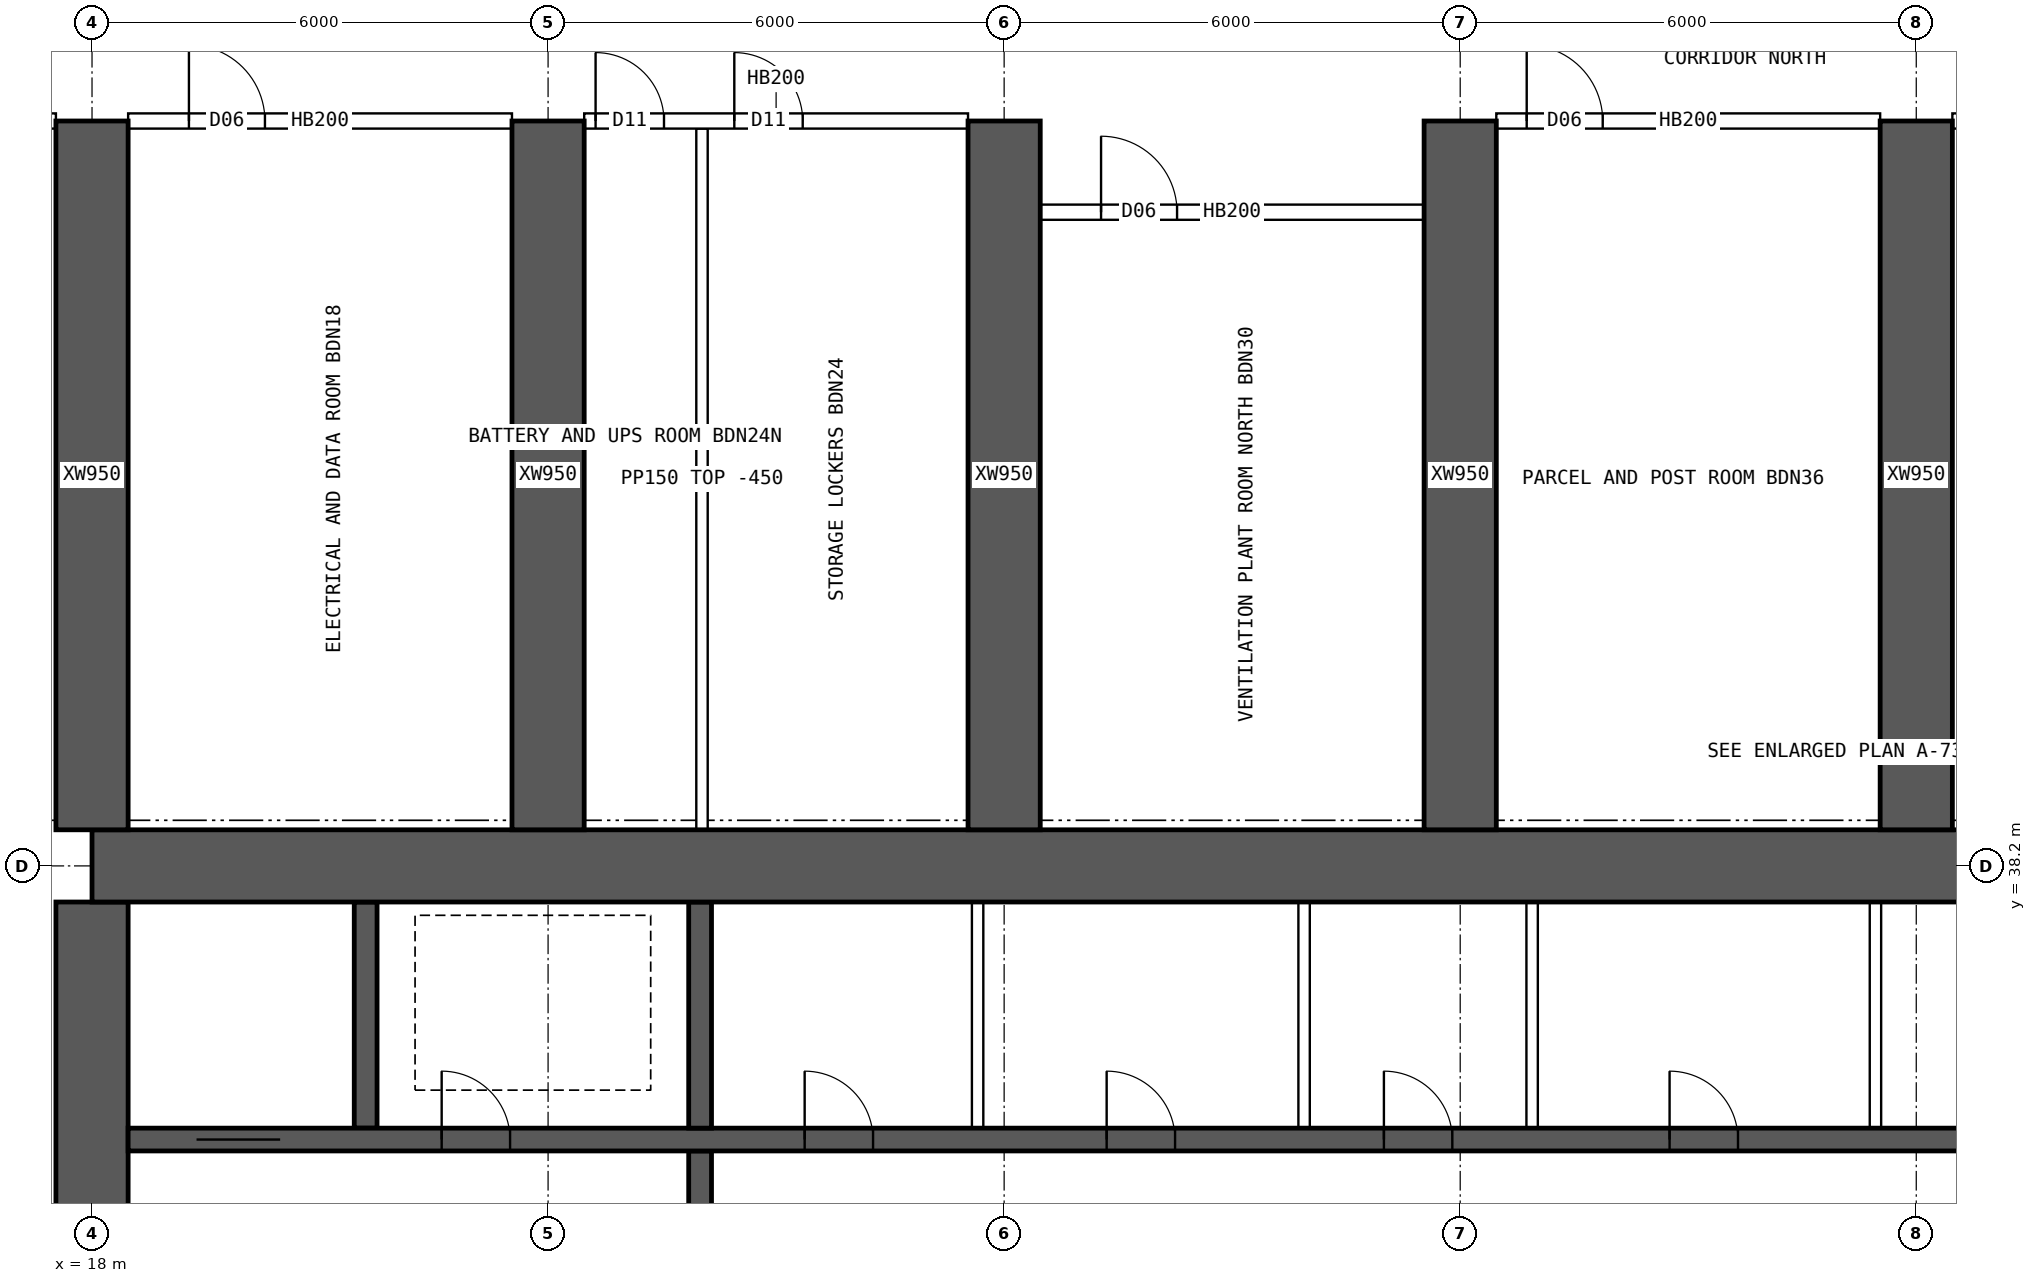
"""IFC4 building model, lengths in metres.
Left out: names, types, materials, properties, quantities, classifications, styles, units other than length and angle.
Written with IfcOpenShell. Run it as: python <this file> out.ifc"""

import sys

from ifc_helpers import new_model, si_unit, direction, frame, frame_2d, origin, place, context, subcontext, project, spatial, rectangle, extrude, element, fill, save


model = new_model("IFC4")
c1 = context("Model", 3, precision=1e-05, world=origin(), true_north=direction((0.0, 1.0)))
c2 = subcontext(c1, "Body", "Model", "MODEL_VIEW")
j1 = project(units=[si_unit("LENGTHUNIT", "METRE"), si_unit("PLANEANGLEUNIT", "RADIAN")], contexts=[c1])
p1 = place(None, origin())
s1 = spatial("IfcSite", under=j1, at=p1, CompositionType="ELEMENT")
p2 = place(p1, origin())
s2 = spatial("IfcBuilding", under=s1, at=p2, CompositionType="ELEMENT")
p3 = place(p2, frame((0.0, 0.0, 110.65)))
s3 = spatial("IfcBuildingStorey", under=s2, at=p3, CompositionType="ELEMENT", Elevation=110.65)
p4 = place(p3, frame((18.0, 38.2, 0.0), z_axis=(0.0, 0.0, 1.0), x_axis=(1.0, 0.0, 0.0)))
e1 = element("IfcWall", 1, at=p4, inside=s3, PredefinedType="SHEAR", context=c2, shape_type="SweptSolid", body=[
    extrude(rectangle(XDim=48.0, YDim=0.95, at=frame_2d((24.0, 0.0))), origin(), (0.0, 0.0, 1.0), 3.75),
])
p5 = place(p3, frame((18.0, 26.275, 0.0), z_axis=(0.0, 0.0, 1.0), x_axis=(0.0, 1.0, 0.0)))
e2 = element("IfcWall", 2, at=p5, inside=s3, PredefinedType="SHEAR", context=c2, shape_type="SweptSolid", body=[
    extrude(rectangle(XDim=11.45, YDim=0.95, at=frame_2d((5.725, 0.0))), origin(), (0.0, 0.0, 1.0), 3.75),
])
p6 = place(p5, frame((5.025, 0.0, 0.0)))
e3 = element("IfcOpeningElement", 3, at=p6, cuts=e2, PredefinedType="OPENING", context=c2, shape_type="SweptSolid", body=[
    extrude(rectangle(XDim=1.2, YDim=2.1, at=frame_2d((0.6, 1.05))), frame((0.0, 0.485, 0.0), z_axis=(0.0, -1.0, 0.0), x_axis=(1.0, 0.0, 0.0)), (0.0, 0.0, 1.0), 0.97),
])
p7 = place(p3, frame((18.475, 34.6, 0.0), z_axis=(0.0, 0.0, 1.0), x_axis=(1.0, 0.0, 0.0)))
e4 = element("IfcWall", 4, at=p7, inside=s3, PredefinedType="SHEAR", context=c2, shape_type="SweptSolid", body=[
    extrude(rectangle(XDim=47.05, YDim=0.3, at=frame_2d((23.525, 0.0))), origin(), (0.0, 0.0, 1.0), 3.75),
])
p8 = place(p7, frame((0.9, 0.0, 0.0)))
e5 = element("IfcOpeningElement", 5, at=p8, cuts=e4, PredefinedType="OPENING", context=c2, shape_type="SweptSolid", body=[
    extrude(rectangle(XDim=1.1, YDim=2.1, at=frame_2d((0.55, 1.05))), frame((0.0, 0.16, 0.0), z_axis=(0.0, -1.0, 0.0), x_axis=(1.0, 0.0, 0.0)), (0.0, 0.0, 1.0), 0.32),
])
p9 = place(p7, frame((45.05, 0.0, 0.0)))
e6 = element("IfcOpeningElement", 6, at=p9, cuts=e4, PredefinedType="OPENING", context=c2, shape_type="SweptSolid", body=[
    extrude(rectangle(XDim=1.1, YDim=2.1, at=frame_2d((0.55, 1.05))), frame((0.0, 0.16, 0.0), z_axis=(0.0, -1.0, 0.0), x_axis=(1.0, 0.0, 0.0)), (0.0, 0.0, 1.0), 0.32),
])
p10 = place(p7, frame((4.125, 0.0, 0.0)))
e7 = element("IfcOpeningElement", 7, at=p10, cuts=e4, PredefinedType="OPENING", context=c2, shape_type="SweptSolid", body=[
    extrude(rectangle(XDim=0.9, YDim=2.1, at=frame_2d((0.45, 1.05))), frame((0.0, 0.16, 0.0), z_axis=(0.0, -1.0, 0.0), x_axis=(1.0, 0.0, 0.0)), (0.0, 0.0, 1.0), 0.32),
])
p11 = place(p7, frame((42.025, 0.0, 0.0)))
e8 = element("IfcOpeningElement", 8, at=p11, cuts=e4, PredefinedType="OPENING", context=c2, shape_type="SweptSolid", body=[
    extrude(rectangle(XDim=0.9, YDim=2.1, at=frame_2d((0.45, 1.05))), frame((0.0, 0.16, 0.0), z_axis=(0.0, -1.0, 0.0), x_axis=(1.0, 0.0, 0.0)), (0.0, 0.0, 1.0), 0.32),
])
p12 = place(p7, frame((8.9, 0.0, 0.0)))
e9 = element("IfcOpeningElement", 9, at=p12, cuts=e4, PredefinedType="OPENING", context=c2, shape_type="SweptSolid", body=[
    extrude(rectangle(XDim=0.9, YDim=2.1, at=frame_2d((0.45, 1.05))), frame((0.0, 0.16, 0.0), z_axis=(0.0, -1.0, 0.0), x_axis=(1.0, 0.0, 0.0)), (0.0, 0.0, 1.0), 0.32),
])
p13 = place(p7, frame((12.874, 0.0, 0.0)))
e10 = element("IfcOpeningElement", 10, at=p13, cuts=e4, PredefinedType="OPENING", context=c2, shape_type="SweptSolid", body=[
    extrude(rectangle(XDim=0.9, YDim=2.1, at=frame_2d((0.45, 1.05))), frame((0.0, 0.16, 0.0), z_axis=(0.0, -1.0, 0.0), x_axis=(1.0, 0.0, 0.0)), (0.0, 0.0, 1.0), 0.32),
])
p14 = place(p7, frame((16.521, 0.0, 0.0)))
e11 = element("IfcOpeningElement", 11, at=p14, cuts=e4, PredefinedType="OPENING", context=c2, shape_type="SweptSolid", body=[
    extrude(rectangle(XDim=0.9, YDim=2.1, at=frame_2d((0.45, 1.05))), frame((0.0, 0.16, 0.0), z_axis=(0.0, -1.0, 0.0), x_axis=(1.0, 0.0, 0.0)), (0.0, 0.0, 1.0), 0.32),
])
p15 = place(p7, frame((20.28, 0.0, 0.0)))
e12 = element("IfcOpeningElement", 12, at=p15, cuts=e4, PredefinedType="OPENING", context=c2, shape_type="SweptSolid", body=[
    extrude(rectangle(XDim=0.9, YDim=2.1, at=frame_2d((0.45, 1.05))), frame((0.0, 0.16, 0.0), z_axis=(0.0, -1.0, 0.0), x_axis=(1.0, 0.0, 0.0)), (0.0, 0.0, 1.0), 0.32),
])
p16 = place(p7, frame((24.686, 0.0, 0.0)))
e13 = element("IfcOpeningElement", 13, at=p16, cuts=e4, PredefinedType="OPENING", context=c2, shape_type="SweptSolid", body=[
    extrude(rectangle(XDim=0.9, YDim=2.1, at=frame_2d((0.45, 1.05))), frame((0.0, 0.16, 0.0), z_axis=(0.0, -1.0, 0.0), x_axis=(1.0, 0.0, 0.0)), (0.0, 0.0, 1.0), 0.32),
])
p17 = place(p7, frame((27.483, 0.0, 0.0)))
e14 = element("IfcOpeningElement", 14, at=p17, cuts=e4, PredefinedType="OPENING", context=c2, shape_type="SweptSolid", body=[
    extrude(rectangle(XDim=0.9, YDim=2.1, at=frame_2d((0.45, 1.05))), frame((0.0, 0.16, 0.0), z_axis=(0.0, -1.0, 0.0), x_axis=(1.0, 0.0, 0.0)), (0.0, 0.0, 1.0), 0.32),
])
p18 = place(p7, frame((29.856, 0.0, 0.0)))
e15 = element("IfcOpeningElement", 15, at=p18, cuts=e4, PredefinedType="OPENING", context=c2, shape_type="SweptSolid", body=[
    extrude(rectangle(XDim=0.9, YDim=2.1, at=frame_2d((0.45, 1.05))), frame((0.0, 0.16, 0.0), z_axis=(0.0, -1.0, 0.0), x_axis=(1.0, 0.0, 0.0)), (0.0, 0.0, 1.0), 0.32),
])
p19 = place(p7, frame((35.326, 0.0, 0.0)))
e16 = element("IfcOpeningElement", 16, at=p19, cuts=e4, PredefinedType="OPENING", context=c2, shape_type="SweptSolid", body=[
    extrude(rectangle(XDim=0.9, YDim=2.1, at=frame_2d((0.45, 1.05))), frame((0.0, 0.16, 0.0), z_axis=(0.0, -1.0, 0.0), x_axis=(1.0, 0.0, 0.0)), (0.0, 0.0, 1.0), 0.32),
])
p20 = place(p3, frame((26.0, 30.55, 0.0), z_axis=(0.0, 0.0, 1.0), x_axis=(0.0, 1.0, 0.0)))
e17 = element("IfcWall", 17, at=p20, inside=s3, PredefinedType="SHEAR", context=c2, shape_type="SweptSolid", body=[
    extrude(rectangle(XDim=3.9, YDim=0.3, at=frame_2d((1.95, 0.0))), origin(), (0.0, 0.0, 1.0), 3.75),
])
p21 = place(p20, frame((1.4, 0.0, 0.0)))
e18 = element("IfcOpeningElement", 18, at=p21, cuts=e17, PredefinedType="OPENING", context=c2, shape_type="SweptSolid", body=[
    extrude(rectangle(XDim=1.2, YDim=2.1, at=frame_2d((0.6, 1.05))), frame((0.0, 0.16, 0.0), z_axis=(0.0, -1.0, 0.0), x_axis=(1.0, 0.0, 0.0)), (0.0, 0.0, 1.0), 0.32),
])
for number, where, z_axis, x_axis in (
    (19, (21.6, 34.75, 0.0), (0.0, 0.0, 1.0), (0.0, 1.0, 0.0)),
    (20, (26.0, 34.75, 0.0), (0.0, 0.0, 1.0), (0.0, 1.0, 0.0)),
):
    element("IfcWall", number, at=place(p3, frame(where, z_axis=z_axis, x_axis=x_axis)), inside=s3, PredefinedType="SHEAR", context=c2, shape_type="SweptSolid", body=[
        extrude(rectangle(XDim=2.975, YDim=0.3, at=frame_2d((1.488, 0.0))), origin(), (0.0, 0.0, 1.0), 3.75),
    ])
for number, where, z_axis, x_axis in (
    (21, (18.0, 38.675, 0.0), (0.0, 0.0, 1.0), (0.0, 1.0, 0.0)),
    (22, (24.0, 38.675, 0.0), (0.0, 0.0, 1.0), (0.0, 1.0, 0.0)),
    (23, (30.0, 38.675, 0.0), (0.0, 0.0, 1.0), (0.0, 1.0, 0.0)),
    (24, (36.0, 38.675, 0.0), (0.0, 0.0, 1.0), (0.0, 1.0, 0.0)),
    (25, (42.0, 38.675, 0.0), (0.0, 0.0, 1.0), (0.0, 1.0, 0.0)),
):
    element("IfcWall", number, at=place(p3, frame(where, z_axis=z_axis, x_axis=x_axis)), inside=s3, PredefinedType="SHEAR", context=c2, shape_type="SweptSolid", body=[
        extrude(rectangle(XDim=9.325, YDim=0.95, at=frame_2d((4.663, 0.0))), origin(), (0.0, 0.0, 1.0), 3.75),
    ])
for number, where, z_axis, x_axis in (
    (26, (29.651, 34.75, 0.0), (0.0, 0.0, 1.0), (0.0, 1.0, 0.0)),
    (27, (33.946, 34.75, 0.0), (0.0, 0.0, 1.0), (0.0, 1.0, 0.0)),
    (28, (36.946, 34.75, 0.0), (0.0, 0.0, 1.0), (0.0, 1.0, 0.0)),
    (29, (41.463, 34.75, 0.0), (0.0, 0.0, 1.0), (0.0, 1.0, 0.0)),
):
    element("IfcWall", number, at=place(p3, frame(where, z_axis=z_axis, x_axis=x_axis)), inside=s3, PredefinedType="SOLIDWALL", context=c2, shape_type="SweptSolid", body=[
        extrude(rectangle(XDim=2.975, YDim=0.15, at=frame_2d((1.488, 0.0))), origin(), (0.0, 0.0, 1.0), 3.3),
    ])
p22 = place(p3, frame((12.475, 48.0, 0.0), z_axis=(0.0, 0.0, 1.0), x_axis=(1.0, 0.0, 0.0)))
e30 = element("IfcWall", 30, at=p22, inside=s3, PredefinedType="SOLIDWALL", context=c2, shape_type="SweptSolid", body=[
    extrude(rectangle(XDim=5.05, YDim=0.2, at=frame_2d((2.525, 0.0))), origin(), (0.0, 0.0, 1.0), 3.3),
])
p23 = place(p22, frame((3.325, 0.0, 0.0)))
e31 = element("IfcOpeningElement", 31, at=p23, cuts=e30, PredefinedType="OPENING", context=c2, shape_type="SweptSolid", body=[
    extrude(rectangle(XDim=1.6, YDim=2.1, at=frame_2d((0.8, 1.05))), frame((0.0, 0.11, 0.0), z_axis=(0.0, -1.0, 0.0), x_axis=(1.0, 0.0, 0.0)), (0.0, 0.0, 1.0), 0.22),
])
p24 = place(p3, frame((18.475, 48.0, 0.0), z_axis=(0.0, 0.0, 1.0), x_axis=(1.0, 0.0, 0.0)))
e32 = element("IfcWall", 32, at=p24, inside=s3, PredefinedType="SOLIDWALL", context=c2, shape_type="SweptSolid", body=[
    extrude(rectangle(XDim=5.05, YDim=0.2, at=frame_2d((2.525, 0.0))), origin(), (0.0, 0.0, 1.0), 3.3),
])
p25 = place(p24, frame((0.8, 0.0, 0.0)))
e33 = element("IfcOpeningElement", 33, at=p25, cuts=e32, PredefinedType="OPENING", context=c2, shape_type="SweptSolid", body=[
    extrude(rectangle(XDim=1.0, YDim=2.1, at=frame_2d((0.5, 1.05))), frame((0.0, 0.11, 0.0), z_axis=(0.0, -1.0, 0.0), x_axis=(1.0, 0.0, 0.0)), (0.0, 0.0, 1.0), 0.22),
])
p26 = place(p3, frame((24.475, 48.0, 0.0), z_axis=(0.0, 0.0, 1.0), x_axis=(1.0, 0.0, 0.0)))
e34 = element("IfcWall", 34, at=p26, inside=s3, PredefinedType="SOLIDWALL", context=c2, shape_type="SweptSolid", body=[
    extrude(rectangle(XDim=5.05, YDim=0.2, at=frame_2d((2.525, 0.0))), origin(), (0.0, 0.0, 1.0), 3.3),
])
p27 = place(p26, frame((0.15, 0.0, 0.0)))
e35 = element("IfcOpeningElement", 35, at=p27, cuts=e34, PredefinedType="OPENING", context=c2, shape_type="SweptSolid", body=[
    extrude(rectangle(XDim=0.9, YDim=2.1, at=frame_2d((0.45, 1.05))), frame((0.0, 0.11, 0.0), z_axis=(0.0, -1.0, 0.0), x_axis=(1.0, 0.0, 0.0)), (0.0, 0.0, 1.0), 0.22),
])
p28 = place(p26, frame((1.975, 0.0, 0.0)))
e36 = element("IfcOpeningElement", 36, at=p28, cuts=e34, PredefinedType="OPENING", context=c2, shape_type="SweptSolid", body=[
    extrude(rectangle(XDim=0.9, YDim=2.1, at=frame_2d((0.45, 1.05))), frame((0.0, 0.11, 0.0), z_axis=(0.0, -1.0, 0.0), x_axis=(1.0, 0.0, 0.0)), (0.0, 0.0, 1.0), 0.22),
])
p29 = place(p3, frame((36.475, 48.0, 0.0), z_axis=(0.0, 0.0, 1.0), x_axis=(1.0, 0.0, 0.0)))
e37 = element("IfcWall", 37, at=p29, inside=s3, PredefinedType="SOLIDWALL", context=c2, shape_type="SweptSolid", body=[
    extrude(rectangle(XDim=5.05, YDim=0.2, at=frame_2d((2.525, 0.0))), origin(), (0.0, 0.0, 1.0), 3.3),
])
p30 = place(p29, frame((0.4, 0.0, 0.0)))
e38 = element("IfcOpeningElement", 38, at=p30, cuts=e37, PredefinedType="OPENING", context=c2, shape_type="SweptSolid", body=[
    extrude(rectangle(XDim=1.0, YDim=2.1, at=frame_2d((0.5, 1.05))), frame((0.0, 0.11, 0.0), z_axis=(0.0, -1.0, 0.0), x_axis=(1.0, 0.0, 0.0)), (0.0, 0.0, 1.0), 0.22),
])
p31 = place(p3, frame((42.475, 48.0, 0.0), z_axis=(0.0, 0.0, 1.0), x_axis=(1.0, 0.0, 0.0)))
e39 = element("IfcWall", 39, at=p31, inside=s3, PredefinedType="SOLIDWALL", context=c2, shape_type="SweptSolid", body=[
    extrude(rectangle(XDim=5.05, YDim=0.2, at=frame_2d((2.525, 0.0))), origin(), (0.0, 0.0, 1.0), 3.3),
])
p32 = place(p31, frame((0.35, 0.0, 0.0)))
e40 = element("IfcOpeningElement", 40, at=p32, cuts=e39, PredefinedType="OPENING", context=c2, shape_type="SweptSolid", body=[
    extrude(rectangle(XDim=0.9, YDim=2.1, at=frame_2d((0.45, 1.05))), frame((0.0, 0.11, 0.0), z_axis=(0.0, -1.0, 0.0), x_axis=(1.0, 0.0, 0.0)), (0.0, 0.0, 1.0), 0.22),
])
p33 = place(p31, frame((3.905, 0.0, 0.0)))
e41 = element("IfcOpeningElement", 41, at=p33, cuts=e39, PredefinedType="OPENING", context=c2, shape_type="SweptSolid", body=[
    extrude(rectangle(XDim=0.9, YDim=2.1, at=frame_2d((0.45, 1.05))), frame((0.0, 0.11, 0.0), z_axis=(0.0, -1.0, 0.0), x_axis=(1.0, 0.0, 0.0)), (0.0, 0.0, 1.0), 0.22),
])
p34 = place(p3, frame((26.025, 38.675, 0.0), z_axis=(0.0, 0.0, 1.0), x_axis=(0.0, 1.0, 0.0)))
e42 = element("IfcWall", 42, at=p34, inside=s3, PredefinedType="PARTITIONING", context=c2, shape_type="SweptSolid", body=[
    extrude(rectangle(XDim=9.225, YDim=0.15, at=frame_2d((4.612, 0.0))), origin(), (0.0, 0.0, 1.0), 3.3),
])
p35 = place(p3, frame((30.475, 46.8, 0.0), z_axis=(0.0, 0.0, 1.0), x_axis=(1.0, 0.0, 0.0)))
e43 = element("IfcWall", 43, at=p35, inside=s3, PredefinedType="SOLIDWALL", context=c2, shape_type="SweptSolid", body=[
    extrude(rectangle(XDim=5.05, YDim=0.2, at=frame_2d((2.525, 0.0))), origin(), (0.0, 0.0, 1.0), 3.3),
])
p36 = place(p35, frame((0.8, 0.0, 0.0)))
e44 = element("IfcOpeningElement", 44, at=p36, cuts=e43, PredefinedType="OPENING", context=c2, shape_type="SweptSolid", body=[
    extrude(rectangle(XDim=1.0, YDim=2.1, at=frame_2d((0.5, 1.05))), frame((0.0, 0.11, 0.0), z_axis=(0.0, -1.0, 0.0), x_axis=(1.0, 0.0, 0.0)), (0.0, 0.0, 1.0), 0.22),
])
p37 = place(p8, origin())
e45 = element("IfcDoor", 45, at=p37, inside=s3, OperationType="DOUBLE_DOOR_SLIDING", PredefinedType="DOOR", context=c2, shape_type="SweptSolid", body=[
    extrude(rectangle(XDim=1.1, YDim=2.1, at=frame_2d((0.55, 1.05))), frame((0.0, 0.025, 0.0), z_axis=(0.0, -1.0, 0.0), x_axis=(1.0, 0.0, 0.0)), (0.0, 0.0, 1.0), 0.05),
])
fill(e5, e45)
p38 = place(p10, origin())
e46 = element("IfcDoor", 46, at=p38, inside=s3, OperationType="SINGLE_SWING_LEFT", PredefinedType="DOOR", context=c2, shape_type="SweptSolid", body=[
    extrude(rectangle(XDim=0.9, YDim=2.1, at=frame_2d((0.45, 1.05))), frame((0.0, 0.025, 0.0), z_axis=(0.0, -1.0, 0.0), x_axis=(1.0, 0.0, 0.0)), (0.0, 0.0, 1.0), 0.05),
])
fill(e7, e46)
p39 = place(p12, origin())
e47 = element("IfcDoor", 47, at=p39, inside=s3, OperationType="SINGLE_SWING_LEFT", PredefinedType="DOOR", context=c2, shape_type="SweptSolid", body=[
    extrude(rectangle(XDim=0.9, YDim=2.1, at=frame_2d((0.45, 1.05))), frame((0.0, 0.025, 0.0), z_axis=(0.0, -1.0, 0.0), x_axis=(1.0, 0.0, 0.0)), (0.0, 0.0, 1.0), 0.05),
])
fill(e9, e47)
p40 = place(p13, origin())
e48 = element("IfcDoor", 48, at=p40, inside=s3, OperationType="SINGLE_SWING_LEFT", PredefinedType="DOOR", context=c2, shape_type="SweptSolid", body=[
    extrude(rectangle(XDim=0.9, YDim=2.1, at=frame_2d((0.45, 1.05))), frame((0.0, 0.025, 0.0), z_axis=(0.0, -1.0, 0.0), x_axis=(1.0, 0.0, 0.0)), (0.0, 0.0, 1.0), 0.05),
])
fill(e10, e48)
p41 = place(p14, origin())
e49 = element("IfcDoor", 49, at=p41, inside=s3, OperationType="SINGLE_SWING_LEFT", PredefinedType="DOOR", context=c2, shape_type="SweptSolid", body=[
    extrude(rectangle(XDim=0.9, YDim=2.1, at=frame_2d((0.45, 1.05))), frame((0.0, 0.025, 0.0), z_axis=(0.0, -1.0, 0.0), x_axis=(1.0, 0.0, 0.0)), (0.0, 0.0, 1.0), 0.05),
])
fill(e11, e49)
p42 = place(p15, origin())
e50 = element("IfcDoor", 50, at=p42, inside=s3, OperationType="SINGLE_SWING_LEFT", PredefinedType="DOOR", context=c2, shape_type="SweptSolid", body=[
    extrude(rectangle(XDim=0.9, YDim=2.1, at=frame_2d((0.45, 1.05))), frame((0.0, 0.025, 0.0), z_axis=(0.0, -1.0, 0.0), x_axis=(1.0, 0.0, 0.0)), (0.0, 0.0, 1.0), 0.05),
])
fill(e12, e50)
p43 = place(p25, origin())
e51 = element("IfcDoor", 51, at=p43, inside=s3, OperationType="SINGLE_SWING_LEFT", PredefinedType="DOOR", context=c2, shape_type="SweptSolid", body=[
    extrude(rectangle(XDim=1.0, YDim=2.1, at=frame_2d((0.5, 1.05))), frame((0.0, 0.025, 0.0), z_axis=(0.0, -1.0, 0.0), x_axis=(1.0, 0.0, 0.0)), (0.0, 0.0, 1.0), 0.05),
])
fill(e33, e51)
p44 = place(p27, origin())
e52 = element("IfcDoor", 52, at=p44, inside=s3, OperationType="SINGLE_SWING_LEFT", PredefinedType="DOOR", context=c2, shape_type="SweptSolid", body=[
    extrude(rectangle(XDim=0.9, YDim=2.1, at=frame_2d((0.45, 1.05))), frame((0.0, 0.025, 0.0), z_axis=(0.0, -1.0, 0.0), x_axis=(1.0, 0.0, 0.0)), (0.0, 0.0, 1.0), 0.05),
])
fill(e35, e52)
p45 = place(p28, origin())
e53 = element("IfcDoor", 53, at=p45, inside=s3, OperationType="SINGLE_SWING_LEFT", PredefinedType="DOOR", context=c2, shape_type="SweptSolid", body=[
    extrude(rectangle(XDim=0.9, YDim=2.1, at=frame_2d((0.45, 1.05))), frame((0.0, 0.025, 0.0), z_axis=(0.0, -1.0, 0.0), x_axis=(1.0, 0.0, 0.0)), (0.0, 0.0, 1.0), 0.05),
])
fill(e36, e53)
p46 = place(p36, origin())
e54 = element("IfcDoor", 54, at=p46, inside=s3, OperationType="SINGLE_SWING_LEFT", PredefinedType="DOOR", context=c2, shape_type="SweptSolid", body=[
    extrude(rectangle(XDim=1.0, YDim=2.1, at=frame_2d((0.5, 1.05))), frame((0.0, 0.025, 0.0), z_axis=(0.0, -1.0, 0.0), x_axis=(1.0, 0.0, 0.0)), (0.0, 0.0, 1.0), 0.05),
])
fill(e44, e54)
p47 = place(p30, origin())
e55 = element("IfcDoor", 55, at=p47, inside=s3, OperationType="SINGLE_SWING_LEFT", PredefinedType="DOOR", context=c2, shape_type="SweptSolid", body=[
    extrude(rectangle(XDim=1.0, YDim=2.1, at=frame_2d((0.5, 1.05))), frame((0.0, 0.025, 0.0), z_axis=(0.0, -1.0, 0.0), x_axis=(1.0, 0.0, 0.0)), (0.0, 0.0, 1.0), 0.05),
])
fill(e38, e55)
save(model, sys.argv[1])
